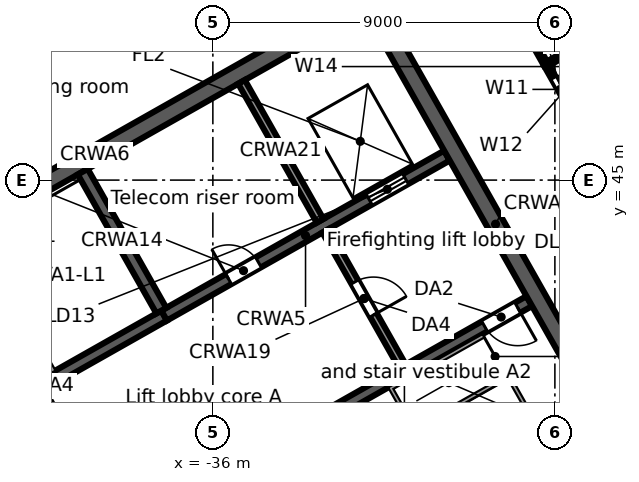
"""IFC4 building model, lengths in metres.
Left out: names, types, materials, properties, quantities, classifications, styles, units other than length and angle.
Written with IfcOpenShell. Run it as: python <this file> out.ifc"""

import sys

from ifc_helpers import new_model, si_unit, direction, frame, frame_2d, origin, place, context, subcontext, project, spatial, rectangle, extrude, element, fill, save


model = new_model("IFC4")
c1 = context("Model", 3, precision=1e-05, world=origin(), true_north=direction((0.0, 1.0)))
c2 = subcontext(c1, "Body", "Model", "MODEL_VIEW")
j1 = project(units=[si_unit("LENGTHUNIT", "METRE"), si_unit("PLANEANGLEUNIT", "RADIAN")], contexts=[c1])
p1 = place(None, origin())
s1 = spatial("IfcSite", under=j1, at=p1, CompositionType="ELEMENT")
p2 = place(p1, origin())
s2 = spatial("IfcBuilding", under=s1, at=p2, CompositionType="ELEMENT")
p3 = place(p2, frame((0.0, 0.0, 223.1)))
s3 = spatial("IfcBuildingStorey", under=s2, at=p3, CompositionType="ELEMENT", Elevation=223.1)
p4 = place(p3, frame((-0.046, 47.974, 0.0), z_axis=(0.0, 0.0, 1.0), x_axis=(-0.870356579543, -0.492421998337, 0.0)))
e1 = element("IfcWall", 1, at=p4, inside=s3, PredefinedType="STANDARD", context=c2, shape_type="SweptSolid", body=[
    extrude(rectangle(XDim=43.754, YDim=0.25, at=frame_2d((21.877, 0.0))), origin(), (0.0, 0.0, 1.0), 3.62),
])
p5 = place(p4, frame((41.061, 0.0, 0.8)))
e2 = element("IfcOpeningElement", 2, at=p5, cuts=e1, PredefinedType="OPENING", context=c2, shape_type="SweptSolid", body=[
    extrude(rectangle(XDim=2.4, YDim=2.2, at=frame_2d((1.2, 1.1))), frame((0.0, 0.135, 0.0), z_axis=(0.0, -1.0, 0.0), x_axis=(1.0, 0.0, 0.0)), (0.0, 0.0, 1.0), 0.27),
])
p6 = place(p4, frame((38.443, 0.0, 0.0)))
e3 = element("IfcOpeningElement", 3, at=p6, cuts=e1, PredefinedType="OPENING", context=c2, shape_type="SweptSolid", body=[
    extrude(rectangle(XDim=1.8, YDim=2.4, at=frame_2d((0.9, 1.2))), frame((0.0, 0.135, 0.0), z_axis=(0.0, -1.0, 0.0), x_axis=(1.0, 0.0, 0.0)), (0.0, 0.0, 1.0), 0.27),
])
p7 = place(p4, frame((35.225, 0.0, 0.8)))
e4 = element("IfcOpeningElement", 4, at=p7, cuts=e1, PredefinedType="OPENING", context=c2, shape_type="SweptSolid", body=[
    extrude(rectangle(XDim=2.4, YDim=2.2, at=frame_2d((1.2, 1.1))), frame((0.0, 0.135, 0.0), z_axis=(0.0, -1.0, 0.0), x_axis=(1.0, 0.0, 0.0)), (0.0, 0.0, 1.0), 0.27),
])
p8 = place(p4, frame((32.307, 0.0, 0.8)))
e5 = element("IfcOpeningElement", 5, at=p8, cuts=e1, PredefinedType="OPENING", context=c2, shape_type="SweptSolid", body=[
    extrude(rectangle(XDim=2.4, YDim=2.2, at=frame_2d((1.2, 1.1))), frame((0.0, 0.135, 0.0), z_axis=(0.0, -1.0, 0.0), x_axis=(1.0, 0.0, 0.0)), (0.0, 0.0, 1.0), 0.27),
])
p9 = place(p4, frame((29.688, 0.0, 0.0)))
e6 = element("IfcOpeningElement", 6, at=p9, cuts=e1, PredefinedType="OPENING", context=c2, shape_type="SweptSolid", body=[
    extrude(rectangle(XDim=1.8, YDim=2.4, at=frame_2d((0.9, 1.2))), frame((0.0, 0.135, 0.0), z_axis=(0.0, -1.0, 0.0), x_axis=(1.0, 0.0, 0.0)), (0.0, 0.0, 1.0), 0.27),
])
p10 = place(p4, frame((26.47, 0.0, 0.8)))
e7 = element("IfcOpeningElement", 7, at=p10, cuts=e1, PredefinedType="OPENING", context=c2, shape_type="SweptSolid", body=[
    extrude(rectangle(XDim=2.4, YDim=2.2, at=frame_2d((1.2, 1.1))), frame((0.0, 0.135, 0.0), z_axis=(0.0, -1.0, 0.0), x_axis=(1.0, 0.0, 0.0)), (0.0, 0.0, 1.0), 0.27),
])
p11 = place(p4, frame((23.552, 0.0, 0.8)))
e8 = element("IfcOpeningElement", 8, at=p11, cuts=e1, PredefinedType="OPENING", context=c2, shape_type="SweptSolid", body=[
    extrude(rectangle(XDim=2.4, YDim=2.2, at=frame_2d((1.2, 1.1))), frame((0.0, 0.135, 0.0), z_axis=(0.0, -1.0, 0.0), x_axis=(1.0, 0.0, 0.0)), (0.0, 0.0, 1.0), 0.27),
])
p12 = place(p4, frame((20.934, 0.0, 0.0)))
e9 = element("IfcOpeningElement", 9, at=p12, cuts=e1, PredefinedType="OPENING", context=c2, shape_type="SweptSolid", body=[
    extrude(rectangle(XDim=1.8, YDim=2.4, at=frame_2d((0.9, 1.2))), frame((0.0, 0.135, 0.0), z_axis=(0.0, -1.0, 0.0), x_axis=(1.0, 0.0, 0.0)), (0.0, 0.0, 1.0), 0.27),
])
p13 = place(p4, frame((17.716, 0.0, 0.8)))
e10 = element("IfcOpeningElement", 10, at=p13, cuts=e1, PredefinedType="OPENING", context=c2, shape_type="SweptSolid", body=[
    extrude(rectangle(XDim=2.4, YDim=2.2, at=frame_2d((1.2, 1.1))), frame((0.0, 0.135, 0.0), z_axis=(0.0, -1.0, 0.0), x_axis=(1.0, 0.0, 0.0)), (0.0, 0.0, 1.0), 0.27),
])
p14 = place(p4, frame((14.798, 0.0, 0.8)))
e11 = element("IfcOpeningElement", 11, at=p14, cuts=e1, PredefinedType="OPENING", context=c2, shape_type="SweptSolid", body=[
    extrude(rectangle(XDim=2.4, YDim=2.2, at=frame_2d((1.2, 1.1))), frame((0.0, 0.135, 0.0), z_axis=(0.0, -1.0, 0.0), x_axis=(1.0, 0.0, 0.0)), (0.0, 0.0, 1.0), 0.27),
])
p15 = place(p4, frame((12.179, 0.0, 0.0)))
e12 = element("IfcOpeningElement", 12, at=p15, cuts=e1, PredefinedType="OPENING", context=c2, shape_type="SweptSolid", body=[
    extrude(rectangle(XDim=1.8, YDim=2.4, at=frame_2d((0.9, 1.2))), frame((0.0, 0.135, 0.0), z_axis=(0.0, -1.0, 0.0), x_axis=(1.0, 0.0, 0.0)), (0.0, 0.0, 1.0), 0.27),
])
p16 = place(p4, frame((8.961, 0.0, 0.8)))
e13 = element("IfcOpeningElement", 13, at=p16, cuts=e1, PredefinedType="OPENING", context=c2, shape_type="SweptSolid", body=[
    extrude(rectangle(XDim=2.4, YDim=2.2, at=frame_2d((1.2, 1.1))), frame((0.0, 0.135, 0.0), z_axis=(0.0, -1.0, 0.0), x_axis=(1.0, 0.0, 0.0)), (0.0, 0.0, 1.0), 0.27),
])
p17 = place(p4, frame((6.043, 0.0, 0.8)))
e14 = element("IfcOpeningElement", 14, at=p17, cuts=e1, PredefinedType="OPENING", context=c2, shape_type="SweptSolid", body=[
    extrude(rectangle(XDim=2.4, YDim=2.2, at=frame_2d((1.2, 1.1))), frame((0.0, 0.135, 0.0), z_axis=(0.0, -1.0, 0.0), x_axis=(1.0, 0.0, 0.0)), (0.0, 0.0, 1.0), 0.27),
])
p18 = place(p4, frame((3.425, 0.0, 0.0)))
e15 = element("IfcOpeningElement", 15, at=p18, cuts=e1, PredefinedType="OPENING", context=c2, shape_type="SweptSolid", body=[
    extrude(rectangle(XDim=1.8, YDim=2.4, at=frame_2d((0.9, 1.2))), frame((0.0, 0.135, 0.0), z_axis=(0.0, -1.0, 0.0), x_axis=(1.0, 0.0, 0.0)), (0.0, 0.0, 1.0), 0.27),
])
p19 = place(p4, frame((0.207, 0.0, 0.8)))
e16 = element("IfcOpeningElement", 16, at=p19, cuts=e1, PredefinedType="OPENING", context=c2, shape_type="SweptSolid", body=[
    extrude(rectangle(XDim=2.4, YDim=2.2, at=frame_2d((1.2, 1.1))), frame((0.0, 0.135, 0.0), z_axis=(0.0, -1.0, 0.0), x_axis=(1.0, 0.0, 0.0)), (0.0, 0.0, 1.0), 0.27),
])
p20 = place(p3, frame((-58.732, 38.771, 0.0), z_axis=(0.0, 0.0, 1.0), x_axis=(0.870354824205, 0.492425100887, 0.0)))
e17 = element("IfcWall", 17, at=p20, inside=s3, PredefinedType="STANDARD", context=c2, shape_type="SweptSolid", body=[
    extrude(rectangle(XDim=64.006, YDim=0.25, at=frame_2d((32.003, 0.0))), origin(), (0.0, 0.0, 1.0), 3.62),
])
p21 = place(p20, frame((61.259, 0.0, 0.8)))
e18 = element("IfcOpeningElement", 18, at=p21, cuts=e17, PredefinedType="OPENING", context=c2, shape_type="SweptSolid", body=[
    extrude(rectangle(XDim=2.4, YDim=2.2, at=frame_2d((1.2, 1.1))), frame((0.0, 0.135, 0.0), z_axis=(0.0, -1.0, 0.0), x_axis=(1.0, 0.0, 0.0)), (0.0, 0.0, 1.0), 0.27),
])
p22 = place(p20, frame((58.216, 0.0, 0.8)))
e19 = element("IfcOpeningElement", 19, at=p22, cuts=e17, PredefinedType="OPENING", context=c2, shape_type="SweptSolid", body=[
    extrude(rectangle(XDim=2.4, YDim=2.2, at=frame_2d((1.2, 1.1))), frame((0.0, 0.135, 0.0), z_axis=(0.0, -1.0, 0.0), x_axis=(1.0, 0.0, 0.0)), (0.0, 0.0, 1.0), 0.27),
])
p23 = place(p20, frame((55.173, 0.0, 0.8)))
e20 = element("IfcOpeningElement", 20, at=p23, cuts=e17, PredefinedType="OPENING", context=c2, shape_type="SweptSolid", body=[
    extrude(rectangle(XDim=2.4, YDim=2.2, at=frame_2d((1.2, 1.1))), frame((0.0, 0.135, 0.0), z_axis=(0.0, -1.0, 0.0), x_axis=(1.0, 0.0, 0.0)), (0.0, 0.0, 1.0), 0.27),
])
p24 = place(p20, frame((52.129, 0.0, 0.8)))
e21 = element("IfcOpeningElement", 21, at=p24, cuts=e17, PredefinedType="OPENING", context=c2, shape_type="SweptSolid", body=[
    extrude(rectangle(XDim=2.4, YDim=2.2, at=frame_2d((1.2, 1.1))), frame((0.0, 0.135, 0.0), z_axis=(0.0, -1.0, 0.0), x_axis=(1.0, 0.0, 0.0)), (0.0, 0.0, 1.0), 0.27),
])
p25 = place(p20, frame((49.086, 0.0, 0.8)))
e22 = element("IfcOpeningElement", 22, at=p25, cuts=e17, PredefinedType="OPENING", context=c2, shape_type="SweptSolid", body=[
    extrude(rectangle(XDim=2.4, YDim=2.2, at=frame_2d((1.2, 1.1))), frame((0.0, 0.135, 0.0), z_axis=(0.0, -1.0, 0.0), x_axis=(1.0, 0.0, 0.0)), (0.0, 0.0, 1.0), 0.27),
])
p26 = place(p20, frame((46.043, 0.0, 0.8)))
e23 = element("IfcOpeningElement", 23, at=p26, cuts=e17, PredefinedType="OPENING", context=c2, shape_type="SweptSolid", body=[
    extrude(rectangle(XDim=2.4, YDim=2.2, at=frame_2d((1.2, 1.1))), frame((0.0, 0.135, 0.0), z_axis=(0.0, -1.0, 0.0), x_axis=(1.0, 0.0, 0.0)), (0.0, 0.0, 1.0), 0.27),
])
p27 = place(p20, frame((43.0, 0.0, 0.8)))
e24 = element("IfcOpeningElement", 24, at=p27, cuts=e17, PredefinedType="OPENING", context=c2, shape_type="SweptSolid", body=[
    extrude(rectangle(XDim=2.4, YDim=2.2, at=frame_2d((1.2, 1.1))), frame((0.0, 0.135, 0.0), z_axis=(0.0, -1.0, 0.0), x_axis=(1.0, 0.0, 0.0)), (0.0, 0.0, 1.0), 0.27),
])
p28 = place(p20, frame((39.956, 0.0, 0.8)))
e25 = element("IfcOpeningElement", 25, at=p28, cuts=e17, PredefinedType="OPENING", context=c2, shape_type="SweptSolid", body=[
    extrude(rectangle(XDim=2.4, YDim=2.2, at=frame_2d((1.2, 1.1))), frame((0.0, 0.135, 0.0), z_axis=(0.0, -1.0, 0.0), x_axis=(1.0, 0.0, 0.0)), (0.0, 0.0, 1.0), 0.27),
])
p29 = place(p20, frame((36.913, 0.0, 0.8)))
e26 = element("IfcOpeningElement", 26, at=p29, cuts=e17, PredefinedType="OPENING", context=c2, shape_type="SweptSolid", body=[
    extrude(rectangle(XDim=2.4, YDim=2.2, at=frame_2d((1.2, 1.1))), frame((0.0, 0.135, 0.0), z_axis=(0.0, -1.0, 0.0), x_axis=(1.0, 0.0, 0.0)), (0.0, 0.0, 1.0), 0.27),
])
p30 = place(p20, frame((33.87, 0.0, 0.8)))
e27 = element("IfcOpeningElement", 27, at=p30, cuts=e17, PredefinedType="OPENING", context=c2, shape_type="SweptSolid", body=[
    extrude(rectangle(XDim=2.4, YDim=2.2, at=frame_2d((1.2, 1.1))), frame((0.0, 0.135, 0.0), z_axis=(0.0, -1.0, 0.0), x_axis=(1.0, 0.0, 0.0)), (0.0, 0.0, 1.0), 0.27),
])
p31 = place(p20, frame((30.826, 0.0, 0.8)))
e28 = element("IfcOpeningElement", 28, at=p31, cuts=e17, PredefinedType="OPENING", context=c2, shape_type="SweptSolid", body=[
    extrude(rectangle(XDim=2.4, YDim=2.2, at=frame_2d((1.2, 1.1))), frame((0.0, 0.135, 0.0), z_axis=(0.0, -1.0, 0.0), x_axis=(1.0, 0.0, 0.0)), (0.0, 0.0, 1.0), 0.27),
])
p32 = place(p20, frame((27.783, 0.0, 0.8)))
e29 = element("IfcOpeningElement", 29, at=p32, cuts=e17, PredefinedType="OPENING", context=c2, shape_type="SweptSolid", body=[
    extrude(rectangle(XDim=2.4, YDim=2.2, at=frame_2d((1.2, 1.1))), frame((0.0, 0.135, 0.0), z_axis=(0.0, -1.0, 0.0), x_axis=(1.0, 0.0, 0.0)), (0.0, 0.0, 1.0), 0.27),
])
p33 = place(p20, frame((24.74, 0.0, 0.8)))
e30 = element("IfcOpeningElement", 30, at=p33, cuts=e17, PredefinedType="OPENING", context=c2, shape_type="SweptSolid", body=[
    extrude(rectangle(XDim=2.4, YDim=2.2, at=frame_2d((1.2, 1.1))), frame((0.0, 0.135, 0.0), z_axis=(0.0, -1.0, 0.0), x_axis=(1.0, 0.0, 0.0)), (0.0, 0.0, 1.0), 0.27),
])
p34 = place(p20, frame((21.696, 0.0, 0.8)))
e31 = element("IfcOpeningElement", 31, at=p34, cuts=e17, PredefinedType="OPENING", context=c2, shape_type="SweptSolid", body=[
    extrude(rectangle(XDim=2.4, YDim=2.2, at=frame_2d((1.2, 1.1))), frame((0.0, 0.135, 0.0), z_axis=(0.0, -1.0, 0.0), x_axis=(1.0, 0.0, 0.0)), (0.0, 0.0, 1.0), 0.27),
])
p35 = place(p20, frame((18.653, 0.0, 0.8)))
e32 = element("IfcOpeningElement", 32, at=p35, cuts=e17, PredefinedType="OPENING", context=c2, shape_type="SweptSolid", body=[
    extrude(rectangle(XDim=2.4, YDim=2.2, at=frame_2d((1.2, 1.1))), frame((0.0, 0.135, 0.0), z_axis=(0.0, -1.0, 0.0), x_axis=(1.0, 0.0, 0.0)), (0.0, 0.0, 1.0), 0.27),
])
p36 = place(p20, frame((15.61, 0.0, 0.8)))
e33 = element("IfcOpeningElement", 33, at=p36, cuts=e17, PredefinedType="OPENING", context=c2, shape_type="SweptSolid", body=[
    extrude(rectangle(XDim=2.4, YDim=2.2, at=frame_2d((1.2, 1.1))), frame((0.0, 0.135, 0.0), z_axis=(0.0, -1.0, 0.0), x_axis=(1.0, 0.0, 0.0)), (0.0, 0.0, 1.0), 0.27),
])
p37 = place(p20, frame((12.567, 0.0, 0.8)))
e34 = element("IfcOpeningElement", 34, at=p37, cuts=e17, PredefinedType="OPENING", context=c2, shape_type="SweptSolid", body=[
    extrude(rectangle(XDim=2.4, YDim=2.2, at=frame_2d((1.2, 1.1))), frame((0.0, 0.135, 0.0), z_axis=(0.0, -1.0, 0.0), x_axis=(1.0, 0.0, 0.0)), (0.0, 0.0, 1.0), 0.27),
])
p38 = place(p20, frame((9.523, 0.0, 0.8)))
e35 = element("IfcOpeningElement", 35, at=p38, cuts=e17, PredefinedType="OPENING", context=c2, shape_type="SweptSolid", body=[
    extrude(rectangle(XDim=2.4, YDim=2.2, at=frame_2d((1.2, 1.1))), frame((0.0, 0.135, 0.0), z_axis=(0.0, -1.0, 0.0), x_axis=(1.0, 0.0, 0.0)), (0.0, 0.0, 1.0), 0.27),
])
p39 = place(p20, frame((6.48, 0.0, 0.8)))
e36 = element("IfcOpeningElement", 36, at=p39, cuts=e17, PredefinedType="OPENING", context=c2, shape_type="SweptSolid", body=[
    extrude(rectangle(XDim=2.4, YDim=2.2, at=frame_2d((1.2, 1.1))), frame((0.0, 0.135, 0.0), z_axis=(0.0, -1.0, 0.0), x_axis=(1.0, 0.0, 0.0)), (0.0, 0.0, 1.0), 0.27),
])
p40 = place(p20, frame((3.437, 0.0, 0.8)))
e37 = element("IfcOpeningElement", 37, at=p40, cuts=e17, PredefinedType="OPENING", context=c2, shape_type="SweptSolid", body=[
    extrude(rectangle(XDim=2.4, YDim=2.2, at=frame_2d((1.2, 1.1))), frame((0.0, 0.135, 0.0), z_axis=(0.0, -1.0, 0.0), x_axis=(1.0, 0.0, 0.0)), (0.0, 0.0, 1.0), 0.27),
])
p41 = place(p20, frame((0.393, 0.0, 0.8)))
e38 = element("IfcOpeningElement", 38, at=p41, cuts=e17, PredefinedType="OPENING", context=c2, shape_type="SweptSolid", body=[
    extrude(rectangle(XDim=2.4, YDim=2.2, at=frame_2d((1.2, 1.1))), frame((0.0, 0.135, 0.0), z_axis=(0.0, -1.0, 0.0), x_axis=(1.0, 0.0, 0.0)), (0.0, 0.0, 1.0), 0.27),
])
p42 = place(p3, frame((-34.245, 38.097, 0.0), z_axis=(0.0, 0.0, 1.0), x_axis=(0.870360409231, 0.492415229297, 0.0)))
e39 = element("IfcWall", 39, at=p42, inside=s3, PredefinedType="SOLIDWALL", context=c2, shape_type="SweptSolid", body=[
    extrude(rectangle(XDim=7.55, YDim=0.3, at=frame_2d((3.775, 0.0))), origin(), (0.0, 0.0, 1.0), 3.62),
])
p43 = place(p42, frame((6.2, 0.0, 0.0)))
e40 = element("IfcOpeningElement", 40, at=p43, cuts=e39, PredefinedType="OPENING", context=c2, shape_type="SweptSolid", body=[
    extrude(rectangle(XDim=1.0, YDim=2.1, at=frame_2d((0.5, 1.05))), frame((0.0, 0.16, 0.0), z_axis=(0.0, -1.0, 0.0), x_axis=(1.0, 0.0, 0.0)), (0.0, 0.0, 1.0), 0.32),
])
p44 = place(p3, frame((-43.853, 37.717, 0.0), z_axis=(0.0, 0.0, 1.0), x_axis=(0.870360409231, 0.492415229297, 0.0)))
e41 = element("IfcWall", 41, at=p44, inside=s3, PredefinedType="SOLIDWALL", context=c2, shape_type="SweptSolid", body=[
    extrude(rectangle(XDim=7.55, YDim=0.3, at=frame_2d((3.775, 0.0))), origin(), (0.0, 0.0, 1.0), 3.62),
])
p45 = place(p44, frame((0.35, 0.0, 0.0)))
e42 = element("IfcOpeningElement", 42, at=p45, cuts=e41, PredefinedType="OPENING", context=c2, shape_type="SweptSolid", body=[
    extrude(rectangle(XDim=1.0, YDim=2.1, at=frame_2d((0.5, 1.05))), frame((0.0, 0.16, 0.0), z_axis=(0.0, -1.0, 0.0), x_axis=(1.0, 0.0, 0.0)), (0.0, 0.0, 1.0), 0.32),
])
p46 = place(p3, frame((-37.282, 41.435, 0.0), z_axis=(0.0, 0.0, 1.0), x_axis=(0.870352688754, 0.492428875248, 0.0)))
e43 = element("IfcWall", 43, at=p46, inside=s3, PredefinedType="SOLIDWALL", context=c2, shape_type="SweptSolid", body=[
    extrude(rectangle(XDim=8.55, YDim=0.3, at=frame_2d((4.275, 0.0))), origin(), (0.0, 0.0, 1.0), 3.62),
])
p47 = place(p46, frame((6.2, 0.0, 0.0)))
e44 = element("IfcOpeningElement", 44, at=p47, cuts=e43, PredefinedType="OPENING", context=c2, shape_type="SweptSolid", body=[
    extrude(rectangle(XDim=1.1, YDim=2.1, at=frame_2d((0.55, 1.05))), frame((0.0, 0.16, 0.0), z_axis=(0.0, -1.0, 0.0), x_axis=(1.0, 0.0, 0.0)), (0.0, 0.0, 1.0), 0.32),
])
p48 = place(p46, frame((1.95, 0.0, 0.0)))
e45 = element("IfcOpeningElement", 45, at=p48, cuts=e43, PredefinedType="OPENING", context=c2, shape_type="SweptSolid", body=[
    extrude(rectangle(XDim=0.9, YDim=2.1, at=frame_2d((0.45, 1.05))), frame((0.0, 0.16, 0.0), z_axis=(0.0, -1.0, 0.0), x_axis=(1.0, 0.0, 0.0)), (0.0, 0.0, 1.0), 0.32),
])
p49 = place(p3, frame((-46.498, 41.477, 0.0), z_axis=(0.0, 0.0, 1.0), x_axis=(0.870359753402, 0.492416388494, 0.0)))
e46 = element("IfcWall", 46, at=p49, inside=s3, PredefinedType="SOLIDWALL", context=c2, shape_type="SweptSolid", body=[
    extrude(rectangle(XDim=17.0, YDim=0.45, at=frame_2d((8.5, 0.0))), origin(), (0.0, 0.0, 1.0), 3.62),
])
p50 = place(p3, frame((-46.191, 41.392, 0.0), z_axis=(0.0, 0.0, 1.0), x_axis=(0.492421378713, -0.870356930107, 0.0)))
e47 = element("IfcWall", 47, at=p50, inside=s3, PredefinedType="SOLIDWALL", context=c2, shape_type="SweptSolid", body=[
    extrude(rectangle(XDim=13.1, YDim=0.45, at=frame_2d((6.55, 0.0))), origin(), (0.0, 0.0, 1.0), 3.62),
])
p51 = place(p3, frame((-40.516, 39.433, 0.0), z_axis=(0.0, 0.0, 1.0), x_axis=(0.492453559952, -0.87033872216, 0.0)))
e48 = element("IfcWall", 48, at=p51, inside=s3, PredefinedType="PARTITIONING", context=c2, shape_type="SweptSolid", body=[
    extrude(rectangle(XDim=4.1, YDim=0.2, at=frame_2d((2.05, 0.0))), origin(), (0.0, 0.0, 1.0), 3.62),
])
p52 = place(p51, frame((1.55, 0.0, 0.0)))
e49 = element("IfcOpeningElement", 49, at=p52, cuts=e48, PredefinedType="OPENING", context=c2, shape_type="SweptSolid", body=[
    extrude(rectangle(XDim=1.0, YDim=2.1, at=frame_2d((0.5, 1.05))), frame((0.0, 0.11, 0.0), z_axis=(0.0, -1.0, 0.0), x_axis=(1.0, 0.0, 0.0)), (0.0, 0.0, 1.0), 0.22),
])
p53 = place(p3, frame((-39.424, 45.22, 0.0), z_axis=(0.0, 0.0, 1.0), x_axis=(0.492409653846, -0.870363563575, 0.0)))
e50 = element("IfcWall", 50, at=p53, inside=s3, PredefinedType="SOLIDWALL", context=c2, shape_type="SweptSolid", body=[
    extrude(rectangle(XDim=4.2, YDim=0.3, at=frame_2d((2.1, 0.0))), origin(), (0.0, 0.0, 1.0), 3.62),
])
p54 = place(p3, frame((-33.031, 43.667, 0.0), z_axis=(0.0, 0.0, 1.0), x_axis=(0.492408451753, -0.87036424366, 0.0)))
e51 = element("IfcWall", 51, at=p54, inside=s3, PredefinedType="PARTITIONING", context=c2, shape_type="SweptSolid", body=[
    extrude(rectangle(XDim=4.1, YDim=0.2, at=frame_2d((2.05, 0.0))), origin(), (0.0, 0.0, 1.0), 3.62),
])
p55 = place(p54, frame((1.55, 0.0, 0.0)))
e52 = element("IfcOpeningElement", 52, at=p55, cuts=e51, PredefinedType="OPENING", context=c2, shape_type="SweptSolid", body=[
    extrude(rectangle(XDim=1.0, YDim=2.1, at=frame_2d((0.5, 1.05))), frame((0.0, 0.11, 0.0), z_axis=(0.0, -1.0, 0.0), x_axis=(1.0, 0.0, 0.0)), (0.0, 0.0, 1.0), 0.22),
])
p56 = place(p3, frame((-35.246, 47.584, 0.0), z_axis=(0.0, 0.0, 1.0), x_axis=(0.492409653846, -0.870363563575, 0.0)))
e53 = element("IfcWall", 53, at=p56, inside=s3, PredefinedType="SOLIDWALL", context=c2, shape_type="SweptSolid", body=[
    extrude(rectangle(XDim=4.2, YDim=0.2, at=frame_2d((2.1, 0.0))), origin(), (0.0, 0.0, 1.0), 3.62),
])
p57 = place(p3, frame((-31.787, 49.542, 0.0), z_axis=(0.0, 0.0, 1.0), x_axis=(0.492421378713, -0.870356930107, 0.0)))
e54 = element("IfcWall", 54, at=p57, inside=s3, PredefinedType="SOLIDWALL", context=c2, shape_type="SweptSolid", body=[
    extrude(rectangle(XDim=13.1, YDim=0.45, at=frame_2d((6.55, 0.0))), origin(), (0.0, 0.0, 1.0), 3.62),
])
p58 = place(p3, frame((-29.201, 51.521, 0.0), z_axis=(0.0, 0.0, 1.0), x_axis=(0.492340861121, -0.870402479587, 0.0)))
e55 = element("IfcWall", 55, at=p58, inside=s3, PredefinedType="PARTITIONING", context=c2, shape_type="SweptSolid", body=[
    extrude(rectangle(XDim=3.999, YDim=0.125, at=frame_2d((2.0, 0.0))), origin(), (0.0, 0.0, 1.0), 3.62),
])
p59 = place(p58, frame((1.45, 0.0, 0.0)))
e56 = element("IfcOpeningElement", 56, at=p59, cuts=e55, PredefinedType="OPENING", context=c2, shape_type="SweptSolid", body=[
    extrude(rectangle(XDim=0.9, YDim=2.1, at=frame_2d((0.45, 1.05))), frame((0.0, 0.073, 0.0), z_axis=(0.0, -1.0, 0.0), x_axis=(1.0, 0.0, 0.0)), (0.0, 0.0, 1.0), 0.145),
])
p60 = place(p3, frame((-27.232, 48.04, 0.0), z_axis=(0.0, 0.0, 1.0), x_axis=(0.492437810475, -0.870347633314, 0.0)))
e57 = element("IfcWall", 57, at=p60, inside=s3, PredefinedType="PARTITIONING", context=c2, shape_type="SweptSolid", body=[
    extrude(rectangle(XDim=1.501, YDim=0.125, at=frame_2d((0.75, 0.0))), origin(), (0.0, 0.0, 1.0), 3.62),
])
p61 = place(p60, frame((0.4, 0.0, 0.0)))
e58 = element("IfcOpeningElement", 58, at=p61, cuts=e57, PredefinedType="OPENING", context=c2, shape_type="SweptSolid", body=[
    extrude(rectangle(XDim=0.9, YDim=2.1, at=frame_2d((0.45, 1.05))), frame((0.0, 0.073, 0.0), z_axis=(0.0, -1.0, 0.0), x_axis=(1.0, 0.0, 0.0)), (0.0, 0.0, 1.0), 0.145),
])
p62 = place(p3, frame((-27.232, 48.04, 0.0), z_axis=(0.0, 0.0, 1.0), x_axis=(0.870339461844, 0.492452252668, 0.0)))
e59 = element("IfcWall", 59, at=p62, inside=s3, PredefinedType="PARTITIONING", context=c2, shape_type="SweptSolid", body=[
    extrude(rectangle(XDim=5.091, YDim=0.125, at=frame_2d((2.545, 0.0))), origin(), (0.0, 0.0, 1.0), 2.892),
])
p63 = place(p47, origin())
e60 = element("IfcDoor", 60, at=p63, inside=s3, OperationType="DOUBLE_DOOR_SLIDING", PredefinedType="DOOR", context=c2, shape_type="SweptSolid", body=[
    extrude(rectangle(XDim=1.1, YDim=2.1, at=frame_2d((0.55, 1.05))), frame((0.0, 0.025, 0.0), z_axis=(0.0, -1.0, 0.0), x_axis=(1.0, 0.0, 0.0)), (0.0, 0.0, 1.0), 0.05),
])
fill(e44, e60)
p64 = place(p43, frame((1.0, 0.0, 0.0), z_axis=(0.0, 0.0, 1.0), x_axis=(-1.0, 0.0, 0.0)))
e61 = element("IfcDoor", 61, at=p64, inside=s3, OperationType="SINGLE_SWING_LEFT", PredefinedType="DOOR", context=c2, shape_type="SweptSolid", body=[
    extrude(rectangle(XDim=1.0, YDim=2.1, at=frame_2d((0.5, 1.05))), frame((0.0, 0.025, 0.0), z_axis=(0.0, -1.0, 0.0), x_axis=(1.0, 0.0, 0.0)), (0.0, 0.0, 1.0), 0.05),
])
fill(e40, e61)
p65 = place(p55, origin())
e62 = element("IfcDoor", 62, at=p65, inside=s3, OperationType="SINGLE_SWING_RIGHT", PredefinedType="DOOR", context=c2, shape_type="SweptSolid", body=[
    extrude(rectangle(XDim=1.0, YDim=2.1, at=frame_2d((0.5, 1.05))), frame((0.0, 0.025, 0.0), z_axis=(0.0, -1.0, 0.0), x_axis=(1.0, 0.0, 0.0)), (0.0, 0.0, 1.0), 0.05),
])
fill(e52, e62)
p66 = place(p48, origin())
e63 = element("IfcDoor", 63, at=p66, inside=s3, OperationType="SINGLE_SWING_LEFT", PredefinedType="DOOR", context=c2, shape_type="SweptSolid", body=[
    extrude(rectangle(XDim=0.9, YDim=2.1, at=frame_2d((0.45, 1.05))), frame((0.0, 0.025, 0.0), z_axis=(0.0, -1.0, 0.0), x_axis=(1.0, 0.0, 0.0)), (0.0, 0.0, 1.0), 0.05),
])
fill(e45, e63)
p67 = place(p61, origin())
e64 = element("IfcDoor", 64, at=p67, inside=s3, OperationType="SINGLE_SWING_RIGHT", PredefinedType="DOOR", context=c2, shape_type="SweptSolid", body=[
    extrude(rectangle(XDim=0.9, YDim=2.1, at=frame_2d((0.45, 1.05))), frame((0.0, 0.025, 0.0), z_axis=(0.0, -1.0, 0.0), x_axis=(1.0, 0.0, 0.0)), (0.0, 0.0, 1.0), 0.05),
])
fill(e58, e64)
save(model, sys.argv[1])
